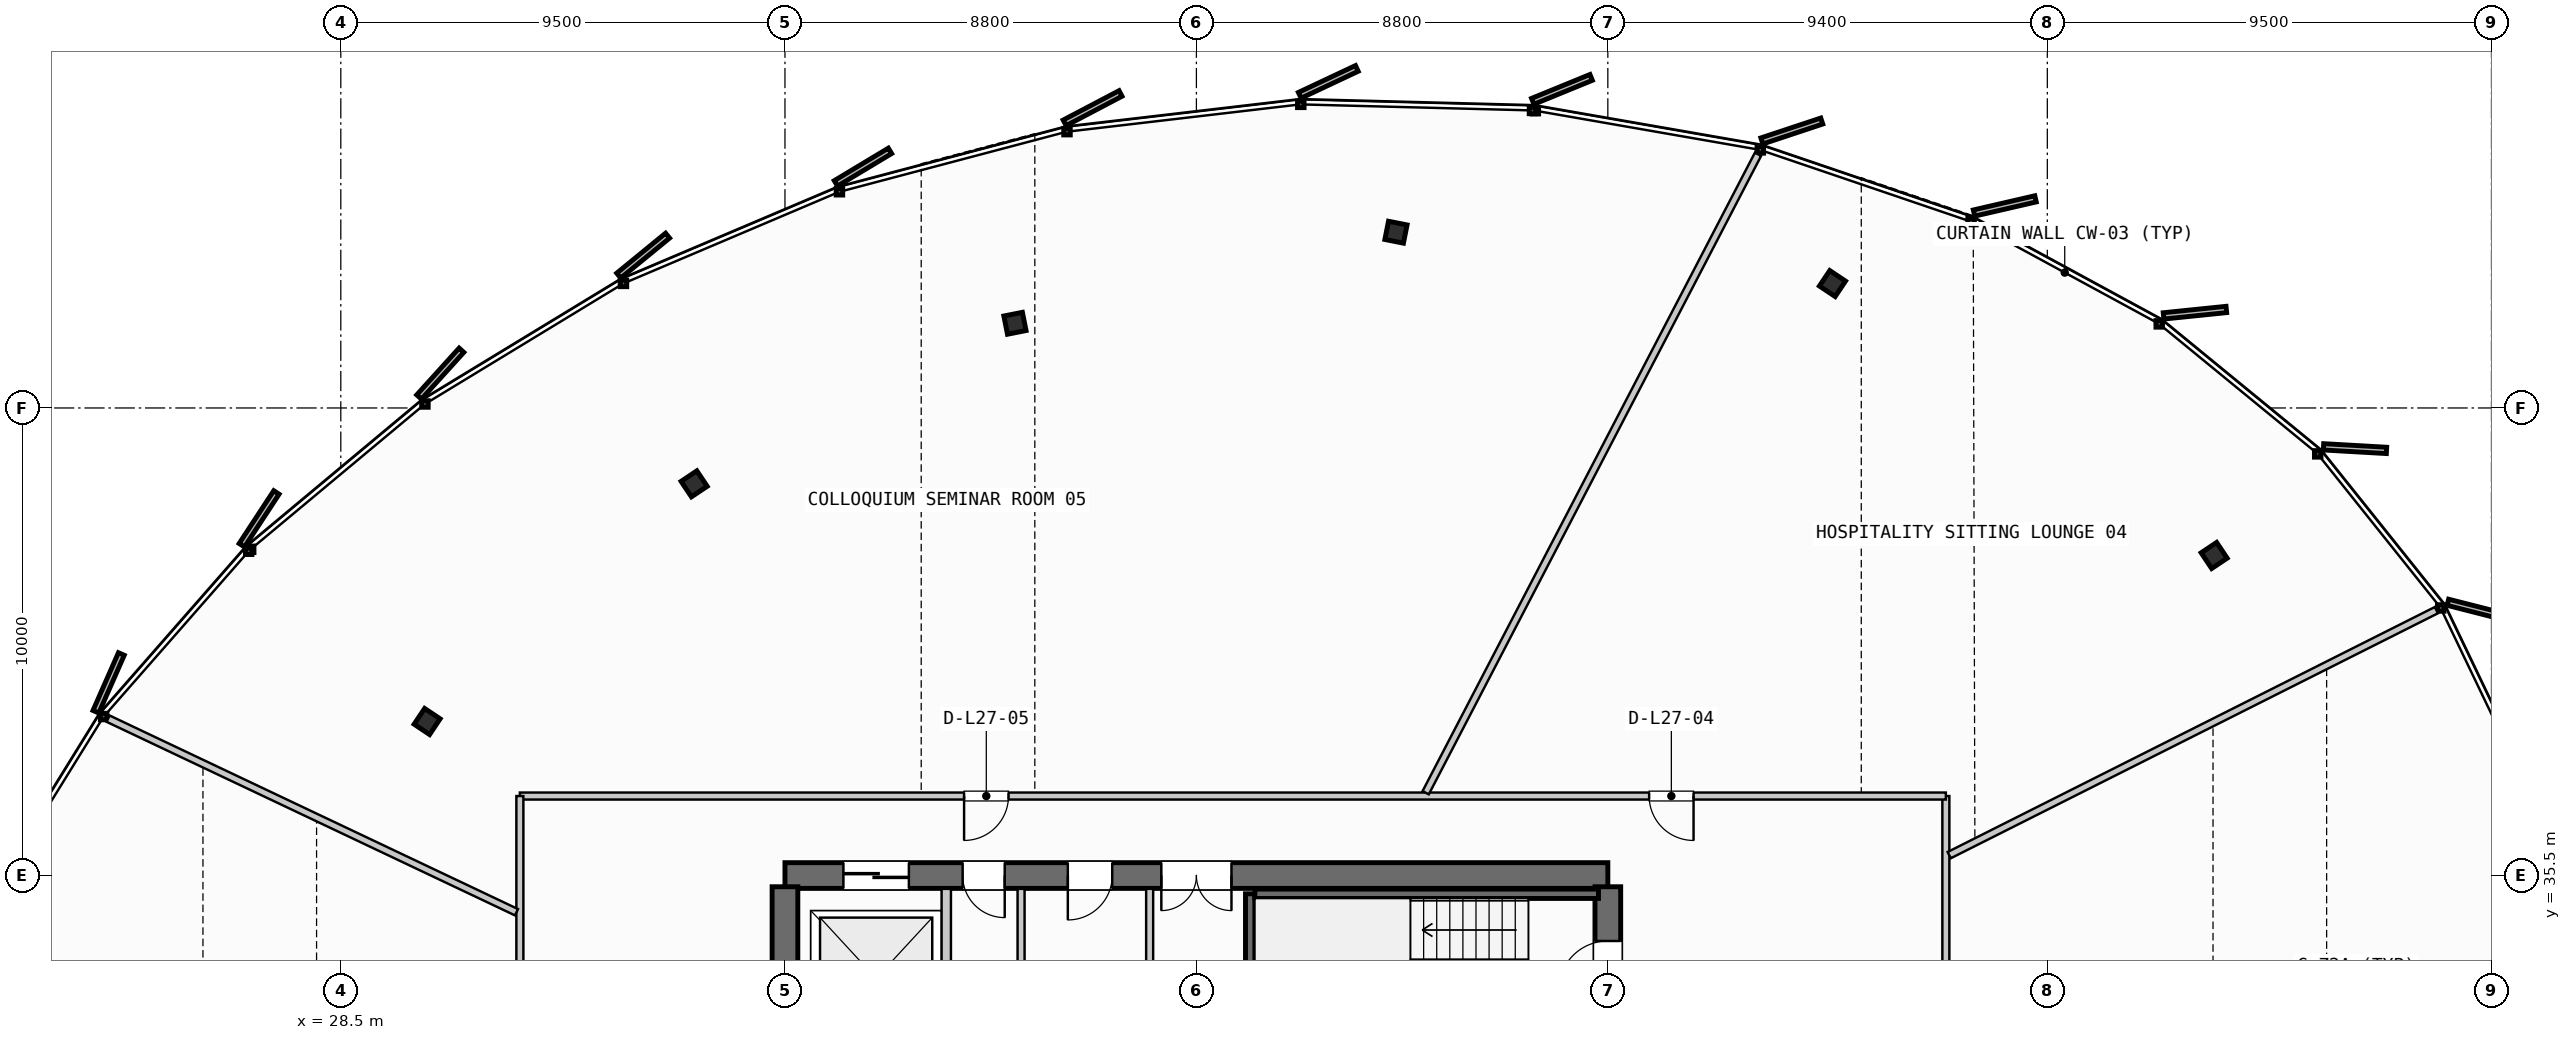
"""IFC4 building model, lengths in metres.
Left out: names, types, materials, properties, quantities, classifications, styles, units other than length and angle.
Written with IfcOpenShell. Run it as: python <this file> out.ifc"""

import sys

from ifc_helpers import new_model, si_unit, direction, frame, frame_2d, origin, origin_2d, place, context, subcontext, project, spatial, rectangle, i_section, extrude, source, transform, mapped, element, fill, save


model = new_model("IFC4")
c1 = context("Model", 3, precision=1e-05, world=origin(), true_north=direction((0.0, 1.0)))
c2 = subcontext(c1, "Body", "Model", "MODEL_VIEW")
j1 = project(units=[si_unit("LENGTHUNIT", "METRE"), si_unit("PLANEANGLEUNIT", "RADIAN")], contexts=[c1])
p1 = place(None, origin())
s1 = spatial("IfcSite", under=j1, at=p1, CompositionType="ELEMENT")
p2 = place(p1, origin())
s2 = spatial("IfcBuilding", under=s1, at=p2, CompositionType="ELEMENT")
p3 = place(p2, frame((0.0, 0.0, 110.8)))
s3 = spatial("IfcBuildingStorey", under=s2, at=p3, CompositionType="ELEMENT", Elevation=110.8)
p4 = place(p3, frame((55.6, 35.5, 0.0), z_axis=(0.0, 0.0, 1.0), x_axis=(-1.0, 0.0, 0.0)))
e1 = element("IfcWall", 1, at=p4, inside=s3, PredefinedType="SHEAR", context=c2, shape_type="SweptSolid", body=[
    extrude(rectangle(XDim=17.6, YDim=0.55, at=frame_2d((8.8, 0.0))), origin(), (0.0, 0.0, 1.0), 3.35),
])
p5 = place(p4, frame((8.05, 0.0, 0.0)))
e2 = element("IfcOpeningElement", 2, at=p5, cuts=e1, PredefinedType="OPENING", context=c2, shape_type="SweptSolid", body=[
    extrude(rectangle(XDim=1.5, YDim=2.2, at=frame_2d((0.75, 1.1))), frame((0.0, 0.285, 0.0), z_axis=(0.0, -1.0, 0.0), x_axis=(1.0, 0.0, 0.0)), (0.0, 0.0, 1.0), 0.57),
])
p6 = place(p4, frame((14.95, 0.0, 0.0)))
e3 = element("IfcOpeningElement", 3, at=p6, cuts=e1, PredefinedType="OPENING", context=c2, shape_type="SweptSolid", body=[
    extrude(rectangle(XDim=1.4, YDim=2.3, at=frame_2d((0.7, 1.15))), frame((0.0, 0.285, 0.0), z_axis=(0.0, -1.0, 0.0), x_axis=(1.0, 0.0, 0.0)), (0.0, 0.0, 1.0), 0.57),
])
p7 = place(p4, frame((12.9, 0.0, 0.0)))
e4 = element("IfcOpeningElement", 4, at=p7, cuts=e1, PredefinedType="OPENING", context=c2, shape_type="SweptSolid", body=[
    extrude(rectangle(XDim=0.9, YDim=2.15, at=frame_2d((0.45, 1.075))), frame((0.0, 0.285, 0.0), z_axis=(0.0, -1.0, 0.0), x_axis=(1.0, 0.0, 0.0)), (0.0, 0.0, 1.0), 0.57),
])
p8 = place(p4, frame((10.6, 0.0, 0.0)))
e5 = element("IfcOpeningElement", 5, at=p8, cuts=e1, PredefinedType="OPENING", context=c2, shape_type="SweptSolid", body=[
    extrude(rectangle(XDim=0.95, YDim=2.15, at=frame_2d((0.475, 1.075))), frame((0.0, 0.285, 0.0), z_axis=(0.0, -1.0, 0.0), x_axis=(1.0, 0.0, 0.0)), (0.0, 0.0, 1.0), 0.57),
])
p9 = place(p3, frame((38.0, 35.26, 0.0), z_axis=(0.0, 0.0, 1.0), x_axis=(0.0, -1.0, 0.0)))
e6 = element("IfcWall", 6, at=p9, inside=s3, PredefinedType="SHEAR", context=c2, shape_type="SweptSolid", body=[
    extrude(rectangle(XDim=14.92, YDim=0.55, at=frame_2d((7.46, 0.0))), origin(), (0.0, 0.0, 1.0), 3.35),
])
p10 = place(p9, frame((5.21, 0.0, 0.0)))
e7 = element("IfcOpeningElement", 7, at=p10, cuts=e6, PredefinedType="OPENING", context=c2, shape_type="SweptSolid", body=[
    extrude(rectangle(XDim=1.1, YDim=2.2, at=frame_2d((0.55, 1.1))), frame((0.0, 0.285, 0.0), z_axis=(0.0, -1.0, 0.0), x_axis=(1.0, 0.0, 0.0)), (0.0, 0.0, 1.0), 0.57),
])
p11 = place(p3, frame((55.6, 20.34, 0.0), z_axis=(0.0, 0.0, 1.0), x_axis=(0.0, 1.0, 0.0)))
e8 = element("IfcWall", 8, at=p11, inside=s3, PredefinedType="SHEAR", context=c2, shape_type="SweptSolid", body=[
    extrude(rectangle(XDim=14.92, YDim=0.55, at=frame_2d((7.46, 0.0))), origin(), (0.0, 0.0, 1.0), 3.35),
])
p12 = place(p11, frame((12.71, 0.0, 0.0)))
e9 = element("IfcOpeningElement", 9, at=p12, cuts=e8, PredefinedType="OPENING", context=c2, shape_type="SweptSolid", body=[
    extrude(rectangle(XDim=1.05, YDim=2.15, at=frame_2d((0.525, 1.075))), frame((0.0, 0.285, 0.0), z_axis=(0.0, -1.0, 0.0), x_axis=(1.0, 0.0, 0.0)), (0.0, 0.0, 1.0), 0.57),
])
p13 = place(p11, frame((8.61, 0.0, 0.0)))
e10 = element("IfcOpeningElement", 10, at=p13, cuts=e8, PredefinedType="OPENING", context=c2, shape_type="SweptSolid", body=[
    extrude(rectangle(XDim=1.1, YDim=2.2, at=frame_2d((0.55, 1.1))), frame((0.0, 0.285, 0.0), z_axis=(0.0, -1.0, 0.0), x_axis=(1.0, 0.0, 0.0)), (0.0, 0.0, 1.0), 0.57),
])
m1 = source(origin(), c2, "Body", "SweptSolid", [
    extrude(i_section(OverallWidth=0.405, OverallDepth=0.398, WebThickness=0.035, FlangeThickness=0.056, FilletRadius=0.015, at=origin_2d()), origin(), (0.0, 0.0, 1.0), 3.35),
])
for number, where, z_axis, x_axis in (
    (11, (68.569, 42.345, 0.0), (0.0, 0.0, 1.0), (0.831, 0.556, 0.0)),
    (12, (60.405, 48.161, 0.0), (0.0, 0.0, 1.0), (0.556, 0.831, 0.0)),
    (13, (51.069, 49.259, 0.0), (0.0, 0.0, 1.0), (0.195, 0.981, 0.0)),
    (14, (42.919, 47.311, 0.0), (0.0, 0.0, 1.0), (-0.195, 0.981, 0.0)),
    (15, (36.058, 43.877, 0.0), (0.0, 0.0, 1.0), (-0.556, 0.831, 0.0)),
    (16, (30.346, 38.794, 0.0), (0.0, 0.0, 1.0), (-0.831, 0.556, 0.0)),
):
    element("IfcColumn", number, at=place(p3, frame(where, z_axis=z_axis, x_axis=x_axis)), inside=s3, PredefinedType="COLUMN", context=c2, shape_type="MappedRepresentation", body=[
        mapped(m1, transform((0.0, 0.0, 0.0), scale=1.0)),
    ])
p14 = place(p3, frame((47.95, 32.05, 0.0), z_axis=(0.0, 0.0, 1.0), x_axis=(0.0, 1.0, 0.0)))
e17 = element("IfcWall", 17, at=p14, inside=s3, PredefinedType="SHEAR", context=c2, shape_type="SweptSolid", body=[
    extrude(rectangle(XDim=3.06, YDim=0.2, at=frame_2d((1.53, 0.0))), origin(), (0.0, 0.0, 1.0), 3.35),
])
p15 = place(p3, frame((48.05, 35.11, 0.0), z_axis=(0.0, 0.0, 1.0), x_axis=(1.0, 0.0, 0.0)))
e18 = element("IfcWall", 18, at=p15, inside=s3, PredefinedType="SHEAR", context=c2, shape_type="SweptSolid", body=[
    extrude(rectangle(XDim=7.35, YDim=0.2, at=frame_2d((3.675, 0.0))), origin(), (0.0, 0.0, 1.0), 3.35),
])
p16 = place(p3, frame((41.45, 31.85, 0.0), z_axis=(0.0, 0.0, 1.0), x_axis=(0.0, 1.0, 0.0)))
e19 = element("IfcWall", 19, at=p16, inside=s3, PredefinedType="PARTITIONING", context=c2, shape_type="SweptSolid", body=[
    extrude(rectangle(XDim=3.365, YDim=0.2, at=frame_2d((1.683, 0.0))), origin(), (0.0, 0.0, 1.0), 2.28),
])
p17 = place(p3, frame((45.8, 31.85, 0.0), z_axis=(0.0, 0.0, 1.0), x_axis=(0.0, 1.0, 0.0)))
e20 = element("IfcWall", 20, at=p17, inside=s3, PredefinedType="PARTITIONING", context=c2, shape_type="SweptSolid", body=[
    extrude(rectangle(XDim=3.365, YDim=0.15, at=frame_2d((1.683, 0.0))), origin(), (0.0, 0.0, 1.0), 2.28),
])
p18 = place(p3, frame((43.05, 31.85, 0.0), z_axis=(0.0, 0.0, 1.0), x_axis=(0.0, 1.0, 0.0)))
e21 = element("IfcWall", 21, at=p18, inside=s3, PredefinedType="PLUMBINGWALL", context=c2, shape_type="SweptSolid", body=[
    extrude(rectangle(XDim=3.365, YDim=0.15, at=frame_2d((1.683, 0.0))), origin(), (0.0, 0.0, 1.0), 2.28),
])
p19 = place(p3, frame((62.83, 17.98, 0.0), z_axis=(0.0, 0.0, 1.0), x_axis=(0.0, 1.0, 0.0)))
e22 = element("IfcWall", 22, at=p19, inside=s3, PredefinedType="PARTITIONING", context=c2, shape_type="SweptSolid", body=[
    extrude(rectangle(XDim=19.22, YDim=0.15, at=frame_2d((9.61, 0.0))), origin(), (0.0, 0.0, 1.0), 2.28),
])
p20 = place(p19, frame((3.924, 0.0, 0.0)))
e23 = element("IfcOpeningElement", 23, at=p20, cuts=e22, PredefinedType="OPENING", context=c2, shape_type="SweptSolid", body=[
    extrude(rectangle(XDim=0.95, YDim=2.15, at=frame_2d((0.475, 1.075))), frame((0.0, 0.085, 0.0), z_axis=(0.0, -1.0, 0.0), x_axis=(1.0, 0.0, 0.0)), (0.0, 0.0, 1.0), 0.17),
])
p21 = place(p19, frame((12.61, 0.0, 0.0)))
e24 = element("IfcOpeningElement", 24, at=p21, cuts=e22, PredefinedType="OPENING", context=c2, shape_type="SweptSolid", body=[
    extrude(rectangle(XDim=0.95, YDim=2.15, at=frame_2d((0.475, 1.075))), frame((0.0, 0.085, 0.0), z_axis=(0.0, -1.0, 0.0), x_axis=(1.0, 0.0, 0.0)), (0.0, 0.0, 1.0), 0.17),
])
p22 = place(p3, frame((62.83, 37.2, 0.0), z_axis=(0.0, 0.0, 1.0), x_axis=(-1.0, 0.0, 0.0)))
e25 = element("IfcWall", 25, at=p22, inside=s3, PredefinedType="PARTITIONING", context=c2, shape_type="SweptSolid", body=[
    extrude(rectangle(XDim=30.5, YDim=0.15, at=frame_2d((15.25, 0.0))), origin(), (0.0, 0.0, 1.0), 2.28),
])
p23 = place(p22, frame((5.396, 0.0, 0.0)))
e26 = element("IfcOpeningElement", 26, at=p23, cuts=e25, PredefinedType="OPENING", context=c2, shape_type="SweptSolid", body=[
    extrude(rectangle(XDim=0.95, YDim=2.15, at=frame_2d((0.475, 1.075))), frame((0.0, 0.085, 0.0), z_axis=(0.0, -1.0, 0.0), x_axis=(1.0, 0.0, 0.0)), (0.0, 0.0, 1.0), 0.17),
])
p24 = place(p22, frame((20.049, 0.0, 0.0)))
e27 = element("IfcOpeningElement", 27, at=p24, cuts=e25, PredefinedType="OPENING", context=c2, shape_type="SweptSolid", body=[
    extrude(rectangle(XDim=0.95, YDim=2.15, at=frame_2d((0.475, 1.075))), frame((0.0, 0.085, 0.0), z_axis=(0.0, -1.0, 0.0), x_axis=(1.0, 0.0, 0.0)), (0.0, 0.0, 1.0), 0.17),
])
p25 = place(p3, frame((32.33, 37.2, 0.0), z_axis=(0.0, 0.0, 1.0), x_axis=(0.0, -1.0, 0.0)))
e28 = element("IfcWall", 28, at=p25, inside=s3, PredefinedType="PARTITIONING", context=c2, shape_type="SweptSolid", body=[
    extrude(rectangle(XDim=19.22, YDim=0.15, at=frame_2d((9.61, 0.0))), origin(), (0.0, 0.0, 1.0), 2.28),
])
p26 = place(p25, frame((10.09, 0.0, 0.0)))
e29 = element("IfcOpeningElement", 29, at=p26, cuts=e28, PredefinedType="OPENING", context=c2, shape_type="SweptSolid", body=[
    extrude(rectangle(XDim=0.95, YDim=2.15, at=frame_2d((0.475, 1.075))), frame((0.0, 0.085, 0.0), z_axis=(0.0, -1.0, 0.0), x_axis=(1.0, 0.0, 0.0)), (0.0, 0.0, 1.0), 0.17),
])
p27 = place(p3, frame((62.902, 35.936, 0.0), z_axis=(0.0, 0.0, 1.0), x_axis=(0.893411700763, 0.449238837302, 0.0)))
e30 = element("IfcWall", 30, at=p27, inside=s3, PredefinedType="PARTITIONING", context=c2, shape_type="SweptSolid", body=[
    extrude(rectangle(XDim=11.663, YDim=0.15, at=frame_2d((5.831, 0.0))), origin(), (0.0, 0.0, 1.0), 2.28),
])
p28 = place(p3, frame((51.704, 37.271, 0.0), z_axis=(0.0, 0.0, 1.0), x_axis=(0.46175664528, 0.887006651914, 0.0)))
e31 = element("IfcWall", 31, at=p28, inside=s3, PredefinedType="PARTITIONING", context=c2, shape_type="SweptSolid", body=[
    extrude(rectangle(XDim=15.395, YDim=0.15, at=frame_2d((7.697, 0.0))), origin(), (0.0, 0.0, 1.0), 2.28),
])
p29 = place(p3, frame((32.258, 34.715, 0.0), z_axis=(0.0, 0.0, 1.0), x_axis=(-0.90364422313, 0.428283922187, 0.0)))
e32 = element("IfcWall", 32, at=p29, inside=s3, PredefinedType="PARTITIONING", context=c2, shape_type="SweptSolid", body=[
    extrude(rectangle(XDim=9.667, YDim=0.15, at=frame_2d((4.833, 0.0))), origin(), (0.0, 0.0, 1.0), 2.28),
])
m2 = source(origin(), c2, "Body", "SweptSolid", [
    extrude(rectangle(XDim=1.05, YDim=2.15, at=frame_2d((0.525, 1.075))), frame((0.0, 0.025, 0.0), z_axis=(0.0, -1.0, 0.0), x_axis=(1.0, 0.0, 0.0)), (0.0, 0.0, 1.0), 0.05),
])
p30 = place(p12, origin())
e33 = element("IfcDoor", 33, at=p30, inside=s3, OperationType="SINGLE_SWING_LEFT", PredefinedType="DOOR", context=c2, shape_type="MappedRepresentation", body=[
    mapped(m2, transform((0.0, 0.0, 0.0), scale=1.0)),
])
fill(e9, e33)
m3 = source(origin(), c2, "Body", "SweptSolid", [
    extrude(rectangle(XDim=1.5, YDim=2.2, at=frame_2d((0.75, 1.1))), frame((0.0, 0.025, 0.0), z_axis=(0.0, -1.0, 0.0), x_axis=(1.0, 0.0, 0.0)), (0.0, 0.0, 1.0), 0.05),
])
p31 = place(p5, origin())
e34 = element("IfcDoor", 34, at=p31, inside=s3, OperationType="DOUBLE_DOOR_SINGLE_SWING", PredefinedType="DOOR", context=c2, shape_type="MappedRepresentation", body=[
    mapped(m3, transform((0.0, 0.0, 0.0), scale=1.0)),
])
fill(e2, e34)
m4 = source(origin(), c2, "Body", "SweptSolid", [
    extrude(rectangle(XDim=1.4, YDim=2.3, at=frame_2d((0.7, 1.15))), frame((0.0, 0.025, 0.0), z_axis=(0.0, -1.0, 0.0), x_axis=(1.0, 0.0, 0.0)), (0.0, 0.0, 1.0), 0.05),
])
p32 = place(p6, origin())
e35 = element("IfcDoor", 35, at=p32, inside=s3, OperationType="SLIDING_TO_RIGHT", PredefinedType="DOOR", context=c2, shape_type="MappedRepresentation", body=[
    mapped(m4, transform((0.0, 0.0, 0.0), scale=1.0)),
])
fill(e3, e35)
m5 = source(origin(), c2, "Body", "SweptSolid", [
    extrude(rectangle(XDim=0.9, YDim=2.15, at=frame_2d((0.45, 1.075))), frame((0.0, 0.025, 0.0), z_axis=(0.0, -1.0, 0.0), x_axis=(1.0, 0.0, 0.0)), (0.0, 0.0, 1.0), 0.05),
])
p33 = place(p7, origin())
e36 = element("IfcDoor", 36, at=p33, inside=s3, OperationType="SINGLE_SWING_LEFT", PredefinedType="DOOR", context=c2, shape_type="MappedRepresentation", body=[
    mapped(m5, transform((0.0, 0.0, 0.0), scale=1.0)),
])
fill(e4, e36)
m6 = source(origin(), c2, "Body", "SweptSolid", [
    extrude(rectangle(XDim=0.95, YDim=2.15, at=frame_2d((0.475, 1.075))), frame((0.0, 0.025, 0.0), z_axis=(0.0, -1.0, 0.0), x_axis=(1.0, 0.0, 0.0)), (0.0, 0.0, 1.0), 0.05),
])
p34 = place(p8, origin())
e37 = element("IfcDoor", 37, at=p34, inside=s3, OperationType="SINGLE_SWING_RIGHT", PredefinedType="DOOR", context=c2, shape_type="MappedRepresentation", body=[
    mapped(m6, transform((0.0, 0.0, 0.0), scale=1.0)),
])
fill(e5, e37)
p35 = place(p23, origin())
e38 = element("IfcDoor", 38, at=p35, inside=s3, OperationType="SINGLE_SWING_LEFT", PredefinedType="DOOR", context=c2, shape_type="MappedRepresentation", body=[
    mapped(m6, transform((0.0, 0.0, 0.0), scale=1.0)),
])
fill(e26, e38)
p36 = place(p24, origin())
e39 = element("IfcDoor", 39, at=p36, inside=s3, OperationType="SINGLE_SWING_RIGHT", PredefinedType="DOOR", context=c2, shape_type="MappedRepresentation", body=[
    mapped(m6, transform((0.0, 0.0, 0.0), scale=1.0)),
])
fill(e27, e39)
save(model, sys.argv[1])
